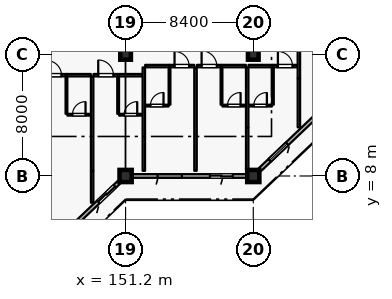
"""IFC4 building model, lengths in metres.
Left out: names, types, materials, properties, quantities, classifications, styles, units other than length and angle.
Written with IfcOpenShell. Run it as: python <this file> out.ifc"""

import sys

from ifc_helpers import new_model, si_unit, direction, frame, frame_2d, origin, origin_2d, place, context, subcontext, project, spatial, rectangle, extrude, element, fill, save


model = new_model("IFC4")
c1 = context("Model", 3, precision=1e-05, world=origin(), true_north=direction((0.0, 1.0)))
c2 = subcontext(c1, "Body", "Model", "MODEL_VIEW")
j1 = project(units=[si_unit("LENGTHUNIT", "METRE"), si_unit("PLANEANGLEUNIT", "RADIAN")], contexts=[c1])
p1 = place(None, origin())
s1 = spatial("IfcSite", under=j1, at=p1, CompositionType="ELEMENT")
p2 = place(p1, origin())
s2 = spatial("IfcBuilding", under=s1, at=p2, CompositionType="ELEMENT")
p3 = place(p2, frame((0.0, 0.0, 25.2)))
s3 = spatial("IfcBuildingStorey", under=s2, at=p3, CompositionType="ELEMENT", Elevation=25.2)
for number, where, z_axis, x_axis in (
    (1, (151.2, 8.0, 0.0), (0.0, 0.0, 1.0), (1.0, 0.0, 0.0)),
    (2, (159.6, 8.0, 0.0), (0.0, 0.0, 1.0), (1.0, 0.0, 0.0)),
):
    element("IfcColumn", number, at=place(p3, frame(where, z_axis=z_axis, x_axis=x_axis)), inside=s3, PredefinedType="COLUMN", context=c2, shape_type="SweptSolid", body=[
        extrude(rectangle(XDim=0.8, YDim=0.8, at=origin_2d()), origin(), (0.0, 0.0, 1.0), 3.6),
    ])
for number, where, z_axis, x_axis in (
    (3, (151.2, 16.0, 0.0), (0.0, 0.0, 1.0), (1.0, 0.0, 0.0)),
    (4, (159.6, 16.0, 0.0), (0.0, 0.0, 1.0), (1.0, 0.0, 0.0)),
):
    element("IfcColumn", number, at=place(p3, frame(where, z_axis=z_axis, x_axis=x_axis)), inside=s3, PredefinedType="COLUMN", context=c2, shape_type="SweptSolid", body=[
        extrude(rectangle(XDim=0.7, YDim=0.7, at=origin_2d()), origin(), (0.0, 0.0, 1.0), 3.6),
    ])
p4 = place(p3, frame((150.8, 7.619, 0.0), z_axis=(0.0, 0.0, 1.0), x_axis=(-0.724156739794, -0.689635422677, 0.0)))
e5 = element("IfcWall", 5, at=p4, inside=s3, PredefinedType="SOLIDWALL", context=c2, shape_type="SweptSolid", body=[
    extrude(rectangle(XDim=10.495, YDim=0.24, at=frame_2d((5.248, 0.0))), origin(), (0.0, 0.0, 1.0), 2.93),
])
p5 = place(p4, frame((0.424, 0.0, 0.0)))
e6 = element("IfcOpeningElement", 6, at=p5, cuts=e5, PredefinedType="OPENING", context=c2, shape_type="SweptSolid", body=[
    extrude(rectangle(XDim=1.5, YDim=2.25, at=frame_2d((0.75, 1.125))), frame((0.0, 0.13, 0.0), z_axis=(0.0, -1.0, 0.0), x_axis=(1.0, 0.0, 0.0)), (0.0, 0.0, 1.0), 0.26),
])
p6 = place(p4, frame((4.033, 0.0, 0.8)))
e7 = element("IfcOpeningElement", 7, at=p6, cuts=e5, PredefinedType="OPENING", context=c2, shape_type="SweptSolid", body=[
    extrude(rectangle(XDim=1.6, YDim=1.6, at=frame_2d((0.8, 0.8))), frame((0.0, 0.13, 0.0), z_axis=(0.0, -1.0, 0.0), x_axis=(1.0, 0.0, 0.0)), (0.0, 0.0, 1.0), 0.26),
])
p7 = place(p4, frame((8.107, 0.0, 0.8)))
e8 = element("IfcOpeningElement", 8, at=p7, cuts=e5, PredefinedType="OPENING", context=c2, shape_type="SweptSolid", body=[
    extrude(rectangle(XDim=1.6, YDim=1.6, at=frame_2d((0.8, 0.8))), frame((0.0, 0.13, 0.0), z_axis=(0.0, -1.0, 0.0), x_axis=(1.0, 0.0, 0.0)), (0.0, 0.0, 1.0), 0.26),
])
p8 = place(p3, frame((159.2, 8.0, 0.0), z_axis=(0.0, 0.0, 1.0), x_axis=(-1.0, 0.0, 0.0)))
e9 = element("IfcWall", 9, at=p8, inside=s3, PredefinedType="SOLIDWALL", context=c2, shape_type="SweptSolid", body=[
    extrude(rectangle(XDim=7.6, YDim=0.24, at=frame_2d((3.8, 0.0))), origin(), (0.0, 0.0, 1.0), 2.93),
])
p9 = place(p8, frame((0.95, 0.0, 0.0)))
e10 = element("IfcOpeningElement", 10, at=p9, cuts=e9, PredefinedType="OPENING", context=c2, shape_type="SweptSolid", body=[
    extrude(rectangle(XDim=1.5, YDim=2.25, at=frame_2d((0.75, 1.125))), frame((0.0, 0.13, 0.0), z_axis=(0.0, -1.0, 0.0), x_axis=(1.0, 0.0, 0.0)), (0.0, 0.0, 1.0), 0.26),
])
p10 = place(p8, frame((4.3, 0.0, 0.8)))
e11 = element("IfcOpeningElement", 11, at=p10, cuts=e9, PredefinedType="OPENING", context=c2, shape_type="SweptSolid", body=[
    extrude(rectangle(XDim=1.6, YDim=1.6, at=frame_2d((0.8, 0.8))), frame((0.0, 0.13, 0.0), z_axis=(0.0, -1.0, 0.0), x_axis=(1.0, 0.0, 0.0)), (0.0, 0.0, 1.0), 0.26),
])
p11 = place(p3, frame((167.6, 15.619, 0.0), z_axis=(0.0, 0.0, 1.0), x_axis=(-0.724156739794, -0.689635422677, 0.0)))
e12 = element("IfcWall", 12, at=p11, inside=s3, PredefinedType="SOLIDWALL", context=c2, shape_type="SweptSolid", body=[
    extrude(rectangle(XDim=10.495, YDim=0.24, at=frame_2d((5.248, 0.0))), origin(), (0.0, 0.0, 1.0), 2.93),
])
p12 = place(p11, frame((0.286, 0.0, 0.0)))
e13 = element("IfcOpeningElement", 13, at=p12, cuts=e12, PredefinedType="OPENING", context=c2, shape_type="SweptSolid", body=[
    extrude(rectangle(XDim=1.5, YDim=2.25, at=frame_2d((0.75, 1.125))), frame((0.0, 0.13, 0.0), z_axis=(0.0, -1.0, 0.0), x_axis=(1.0, 0.0, 0.0)), (0.0, 0.0, 1.0), 0.26),
])
p13 = place(p11, frame((3.757, 0.0, 0.8)))
e14 = element("IfcOpeningElement", 14, at=p13, cuts=e12, PredefinedType="OPENING", context=c2, shape_type="SweptSolid", body=[
    extrude(rectangle(XDim=1.6, YDim=1.6, at=frame_2d((0.8, 0.8))), frame((0.0, 0.13, 0.0), z_axis=(0.0, -1.0, 0.0), x_axis=(1.0, 0.0, 0.0)), (0.0, 0.0, 1.0), 0.26),
])
p14 = place(p11, frame((7.969, 0.0, 0.8)))
e15 = element("IfcOpeningElement", 15, at=p14, cuts=e12, PredefinedType="OPENING", context=c2, shape_type="SweptSolid", body=[
    extrude(rectangle(XDim=1.6, YDim=1.6, at=frame_2d((0.8, 0.8))), frame((0.0, 0.13, 0.0), z_axis=(0.0, -1.0, 0.0), x_axis=(1.0, 0.0, 0.0)), (0.0, 0.0, 1.0), 0.26),
])
p15 = place(p3, frame((145.69, 14.63, 0.0), z_axis=(0.0, 0.0, 1.0), x_axis=(1.0, 0.0, 0.0)))
e16 = element("IfcWall", 16, at=p15, inside=s3, PredefinedType="PARTITIONING", context=c2, shape_type="SweptSolid", body=[
    extrude(rectangle(XDim=1.62, YDim=0.16, at=frame_2d((0.81, 0.0))), origin(), (0.0, 0.0, 1.0), 3.335),
])
p16 = place(p15, frame((0.33, 0.0, 0.0)))
e17 = element("IfcOpeningElement", 17, at=p16, cuts=e16, PredefinedType="OPENING", context=c2, shape_type="SweptSolid", body=[
    extrude(rectangle(XDim=0.96, YDim=2.2, at=frame_2d((0.48, 1.1))), frame((0.0, 0.09, 0.0), z_axis=(0.0, -1.0, 0.0), x_axis=(1.0, 0.0, 0.0)), (0.0, 0.0, 1.0), 0.18),
])
p17 = place(p3, frame((147.32, 14.63, 0.0), z_axis=(0.0, 0.0, 1.0), x_axis=(1.0, 0.0, 0.0)))
e18 = element("IfcWall", 18, at=p17, inside=s3, PredefinedType="PARTITIONING", context=c2, shape_type="SweptSolid", body=[
    extrude(rectangle(XDim=1.59, YDim=0.16, at=frame_2d((0.795, 0.0))), origin(), (0.0, 0.0, 1.0), 3.335),
])
p18 = place(p3, frame((147.31, 12.09, 0.0), z_axis=(0.0, 0.0, 1.0), x_axis=(0.0, 1.0, 0.0)))
e19 = element("IfcWall", 19, at=p18, inside=s3, PredefinedType="PARTITIONING", context=c2, shape_type="SweptSolid", body=[
    extrude(rectangle(XDim=2.45, YDim=0.115, at=frame_2d((1.225, 0.0))), origin(), (0.0, 0.0, 1.0), 3.335),
])
p19 = place(p3, frame((147.37, 12.03, 0.0), z_axis=(0.0, 0.0, 1.0), x_axis=(1.0, 0.0, 0.0)))
e20 = element("IfcWall", 20, at=p19, inside=s3, PredefinedType="PARTITIONING", context=c2, shape_type="SweptSolid", body=[
    extrude(rectangle(XDim=1.53, YDim=0.115, at=frame_2d((0.765, 0.0))), origin(), (0.0, 0.0, 1.0), 3.335),
])
p20 = place(p19, frame((0.335, 0.0, 0.0)))
e21 = element("IfcOpeningElement", 21, at=p20, cuts=e20, PredefinedType="OPENING", context=c2, shape_type="SweptSolid", body=[
    extrude(rectangle(XDim=0.86, YDim=2.12, at=frame_2d((0.43, 1.06))), frame((0.0, 0.067, 0.0), z_axis=(0.0, -1.0, 0.0), x_axis=(1.0, 0.0, 0.0)), (0.0, 0.0, 1.0), 0.135),
])
p21 = place(p3, frame((149.0, 6.24, 0.0), z_axis=(0.0, 0.0, 1.0), x_axis=(0.0, 1.0, 0.0)))
e22 = element("IfcWall", 22, at=p21, inside=s3, PredefinedType="PARTITIONING", context=c2, shape_type="SweptSolid", body=[
    extrude(rectangle(XDim=2.09, YDim=0.16, at=frame_2d((1.045, 0.0))), origin(), (0.0, 0.0, 1.0), 3.335),
])
p22 = place(p3, frame((149.09, 14.63, 0.0), z_axis=(0.0, 0.0, 1.0), x_axis=(1.0, 0.0, 0.0)))
e23 = element("IfcWall", 23, at=p22, inside=s3, PredefinedType="PARTITIONING", context=c2, shape_type="SweptSolid", body=[
    extrude(rectangle(XDim=1.62, YDim=0.16, at=frame_2d((0.81, 0.0))), origin(), (0.0, 0.0, 1.0), 3.335),
])
p23 = place(p22, frame((0.31, 0.0, 0.0)))
e24 = element("IfcOpeningElement", 24, at=p23, cuts=e23, PredefinedType="OPENING", context=c2, shape_type="SweptSolid", body=[
    extrude(rectangle(XDim=1.0, YDim=2.25, at=frame_2d((0.5, 1.125))), frame((0.0, 0.09, 0.0), z_axis=(0.0, -1.0, 0.0), x_axis=(1.0, 0.0, 0.0)), (0.0, 0.0, 1.0), 0.18),
])
p24 = place(p3, frame((150.72, 14.63, 0.0), z_axis=(0.0, 0.0, 1.0), x_axis=(1.0, 0.0, 0.0)))
e25 = element("IfcWall", 25, at=p24, inside=s3, PredefinedType="PARTITIONING", context=c2, shape_type="SweptSolid", body=[
    extrude(rectangle(XDim=1.59, YDim=0.16, at=frame_2d((0.795, 0.0))), origin(), (0.0, 0.0, 1.0), 3.335),
])
p25 = place(p3, frame((150.71, 12.09, 0.0), z_axis=(0.0, 0.0, 1.0), x_axis=(0.0, 1.0, 0.0)))
e26 = element("IfcWall", 26, at=p25, inside=s3, PredefinedType="PARTITIONING", context=c2, shape_type="SweptSolid", body=[
    extrude(rectangle(XDim=2.45, YDim=0.115, at=frame_2d((1.225, 0.0))), origin(), (0.0, 0.0, 1.0), 3.335),
])
p26 = place(p3, frame((150.77, 12.03, 0.0), z_axis=(0.0, 0.0, 1.0), x_axis=(1.0, 0.0, 0.0)))
e27 = element("IfcWall", 27, at=p26, inside=s3, PredefinedType="PARTITIONING", context=c2, shape_type="SweptSolid", body=[
    extrude(rectangle(XDim=1.53, YDim=0.115, at=frame_2d((0.765, 0.0))), origin(), (0.0, 0.0, 1.0), 3.335),
])
p27 = place(p26, frame((0.335, 0.0, 0.0)))
e28 = element("IfcOpeningElement", 28, at=p27, cuts=e27, PredefinedType="OPENING", context=c2, shape_type="SweptSolid", body=[
    extrude(rectangle(XDim=0.86, YDim=2.12, at=frame_2d((0.43, 1.06))), frame((0.0, 0.067, 0.0), z_axis=(0.0, -1.0, 0.0), x_axis=(1.0, 0.0, 0.0)), (0.0, 0.0, 1.0), 0.135),
])
p28 = place(p3, frame((149.0, 8.34, 0.0), z_axis=(0.0, 0.0, 1.0), x_axis=(0.0, 1.0, 0.0)))
e29 = element("IfcWall", 29, at=p28, inside=s3, PredefinedType="PARTITIONING", context=c2, shape_type="SweptSolid", body=[
    extrude(rectangle(XDim=6.2, YDim=0.16, at=frame_2d((3.1, 0.0))), origin(), (0.0, 0.0, 1.0), 3.335),
])
p29 = place(p3, frame((152.49, 15.23, 0.0), z_axis=(0.0, 0.0, 1.0), x_axis=(1.0, 0.0, 0.0)))
e30 = element("IfcWall", 30, at=p29, inside=s3, PredefinedType="PARTITIONING", context=c2, shape_type="SweptSolid", body=[
    extrude(rectangle(XDim=1.59, YDim=0.16, at=frame_2d((0.795, 0.0))), origin(), (0.0, 0.0, 1.0), 3.335),
])
p30 = place(p3, frame((154.09, 15.23, 0.0), z_axis=(0.0, 0.0, 1.0), x_axis=(1.0, 0.0, 0.0)))
e31 = element("IfcWall", 31, at=p30, inside=s3, PredefinedType="PARTITIONING", context=c2, shape_type="SweptSolid", body=[
    extrude(rectangle(XDim=1.62, YDim=0.16, at=frame_2d((0.81, 0.0))), origin(), (0.0, 0.0, 1.0), 3.335),
])
p31 = place(p30, frame((0.33, 0.0, 0.0)))
e32 = element("IfcOpeningElement", 32, at=p31, cuts=e31, PredefinedType="OPENING", context=c2, shape_type="SweptSolid", body=[
    extrude(rectangle(XDim=0.96, YDim=2.2, at=frame_2d((0.48, 1.1))), frame((0.0, 0.09, 0.0), z_axis=(0.0, -1.0, 0.0), x_axis=(1.0, 0.0, 0.0)), (0.0, 0.0, 1.0), 0.18),
])
p32 = place(p3, frame((154.09, 12.69, 0.0), z_axis=(0.0, 0.0, 1.0), x_axis=(0.0, 1.0, 0.0)))
e33 = element("IfcWall", 33, at=p32, inside=s3, PredefinedType="PARTITIONING", context=c2, shape_type="SweptSolid", body=[
    extrude(rectangle(XDim=2.45, YDim=0.115, at=frame_2d((1.225, 0.0))), origin(), (0.0, 0.0, 1.0), 3.335),
])
p33 = place(p3, frame((152.5, 12.63, 0.0), z_axis=(0.0, 0.0, 1.0), x_axis=(1.0, 0.0, 0.0)))
e34 = element("IfcWall", 34, at=p33, inside=s3, PredefinedType="PARTITIONING", context=c2, shape_type="SweptSolid", body=[
    extrude(rectangle(XDim=1.53, YDim=0.115, at=frame_2d((0.765, 0.0))), origin(), (0.0, 0.0, 1.0), 3.335),
])
p34 = place(p33, frame((0.335, 0.0, 0.0)))
e35 = element("IfcOpeningElement", 35, at=p34, cuts=e34, PredefinedType="OPENING", context=c2, shape_type="SweptSolid", body=[
    extrude(rectangle(XDim=0.86, YDim=2.12, at=frame_2d((0.43, 1.06))), frame((0.0, 0.067, 0.0), z_axis=(0.0, -1.0, 0.0), x_axis=(1.0, 0.0, 0.0)), (0.0, 0.0, 1.0), 0.135),
])
p35 = place(p3, frame((152.4, 8.34, 0.0), z_axis=(0.0, 0.0, 1.0), x_axis=(0.0, 1.0, 0.0)))
e36 = element("IfcWall", 36, at=p35, inside=s3, PredefinedType="PARTITIONING", context=c2, shape_type="SweptSolid", body=[
    extrude(rectangle(XDim=6.8, YDim=0.16, at=frame_2d((3.4, 0.0))), origin(), (0.0, 0.0, 1.0), 3.335),
])
p36 = place(p3, frame((155.89, 15.23, 0.0), z_axis=(0.0, 0.0, 1.0), x_axis=(1.0, 0.0, 0.0)))
e37 = element("IfcWall", 37, at=p36, inside=s3, PredefinedType="PARTITIONING", context=c2, shape_type="SweptSolid", body=[
    extrude(rectangle(XDim=1.62, YDim=0.16, at=frame_2d((0.81, 0.0))), origin(), (0.0, 0.0, 1.0), 3.335),
])
p37 = place(p36, frame((0.31, 0.0, 0.0)))
e38 = element("IfcOpeningElement", 38, at=p37, cuts=e37, PredefinedType="OPENING", context=c2, shape_type="SweptSolid", body=[
    extrude(rectangle(XDim=1.0, YDim=2.25, at=frame_2d((0.5, 1.125))), frame((0.0, 0.09, 0.0), z_axis=(0.0, -1.0, 0.0), x_axis=(1.0, 0.0, 0.0)), (0.0, 0.0, 1.0), 0.18),
])
p38 = place(p3, frame((157.52, 15.23, 0.0), z_axis=(0.0, 0.0, 1.0), x_axis=(1.0, 0.0, 0.0)))
e39 = element("IfcWall", 39, at=p38, inside=s3, PredefinedType="PARTITIONING", context=c2, shape_type="SweptSolid", body=[
    extrude(rectangle(XDim=1.59, YDim=0.16, at=frame_2d((0.795, 0.0))), origin(), (0.0, 0.0, 1.0), 3.335),
])
p39 = place(p3, frame((157.51, 12.69, 0.0), z_axis=(0.0, 0.0, 1.0), x_axis=(0.0, 1.0, 0.0)))
e40 = element("IfcWall", 40, at=p39, inside=s3, PredefinedType="PARTITIONING", context=c2, shape_type="SweptSolid", body=[
    extrude(rectangle(XDim=2.45, YDim=0.115, at=frame_2d((1.225, 0.0))), origin(), (0.0, 0.0, 1.0), 3.335),
])
p40 = place(p3, frame((157.57, 12.63, 0.0), z_axis=(0.0, 0.0, 1.0), x_axis=(1.0, 0.0, 0.0)))
e41 = element("IfcWall", 41, at=p40, inside=s3, PredefinedType="PARTITIONING", context=c2, shape_type="SweptSolid", body=[
    extrude(rectangle(XDim=1.53, YDim=0.115, at=frame_2d((0.765, 0.0))), origin(), (0.0, 0.0, 1.0), 3.335),
])
p41 = place(p40, frame((0.335, 0.0, 0.0)))
e42 = element("IfcOpeningElement", 42, at=p41, cuts=e41, PredefinedType="OPENING", context=c2, shape_type="SweptSolid", body=[
    extrude(rectangle(XDim=0.86, YDim=2.12, at=frame_2d((0.43, 1.06))), frame((0.0, 0.067, 0.0), z_axis=(0.0, -1.0, 0.0), x_axis=(1.0, 0.0, 0.0)), (0.0, 0.0, 1.0), 0.135),
])
p42 = place(p3, frame((155.8, 8.34, 0.0), z_axis=(0.0, 0.0, 1.0), x_axis=(0.0, 1.0, 0.0)))
e43 = element("IfcWall", 43, at=p42, inside=s3, PredefinedType="PARTITIONING", context=c2, shape_type="SweptSolid", body=[
    extrude(rectangle(XDim=6.8, YDim=0.16, at=frame_2d((3.4, 0.0))), origin(), (0.0, 0.0, 1.0), 3.335),
])
p43 = place(p3, frame((159.2, 8.41, 0.0), z_axis=(0.0, 0.0, 1.0), x_axis=(0.0, 1.0, 0.0)))
e44 = element("IfcWall", 44, at=p43, inside=s3, PredefinedType="PARTITIONING", context=c2, shape_type="SweptSolid", body=[
    extrude(rectangle(XDim=2.78, YDim=0.16, at=frame_2d((1.39, 0.0))), origin(), (0.0, 0.0, 1.0), 3.335),
])
p44 = place(p3, frame((159.29, 15.23, 0.0), z_axis=(0.0, 0.0, 1.0), x_axis=(1.0, 0.0, 0.0)))
e45 = element("IfcWall", 45, at=p44, inside=s3, PredefinedType="PARTITIONING", context=c2, shape_type="SweptSolid", body=[
    extrude(rectangle(XDim=1.59, YDim=0.16, at=frame_2d((0.795, 0.0))), origin(), (0.0, 0.0, 1.0), 3.335),
])
p45 = place(p3, frame((160.89, 15.23, 0.0), z_axis=(0.0, 0.0, 1.0), x_axis=(1.0, 0.0, 0.0)))
e46 = element("IfcWall", 46, at=p45, inside=s3, PredefinedType="PARTITIONING", context=c2, shape_type="SweptSolid", body=[
    extrude(rectangle(XDim=1.62, YDim=0.16, at=frame_2d((0.81, 0.0))), origin(), (0.0, 0.0, 1.0), 3.335),
])
p46 = place(p45, frame((0.33, 0.0, 0.0)))
e47 = element("IfcOpeningElement", 47, at=p46, cuts=e46, PredefinedType="OPENING", context=c2, shape_type="SweptSolid", body=[
    extrude(rectangle(XDim=0.96, YDim=2.2, at=frame_2d((0.48, 1.1))), frame((0.0, 0.09, 0.0), z_axis=(0.0, -1.0, 0.0), x_axis=(1.0, 0.0, 0.0)), (0.0, 0.0, 1.0), 0.18),
])
p47 = place(p3, frame((160.89, 12.69, 0.0), z_axis=(0.0, 0.0, 1.0), x_axis=(0.0, 1.0, 0.0)))
e48 = element("IfcWall", 48, at=p47, inside=s3, PredefinedType="PARTITIONING", context=c2, shape_type="SweptSolid", body=[
    extrude(rectangle(XDim=2.45, YDim=0.115, at=frame_2d((1.225, 0.0))), origin(), (0.0, 0.0, 1.0), 3.335),
])
p48 = place(p3, frame((159.3, 12.63, 0.0), z_axis=(0.0, 0.0, 1.0), x_axis=(1.0, 0.0, 0.0)))
e49 = element("IfcWall", 49, at=p48, inside=s3, PredefinedType="PARTITIONING", context=c2, shape_type="SweptSolid", body=[
    extrude(rectangle(XDim=1.53, YDim=0.115, at=frame_2d((0.765, 0.0))), origin(), (0.0, 0.0, 1.0), 3.335),
])
p49 = place(p48, frame((0.335, 0.0, 0.0)))
e50 = element("IfcOpeningElement", 50, at=p49, cuts=e49, PredefinedType="OPENING", context=c2, shape_type="SweptSolid", body=[
    extrude(rectangle(XDim=0.86, YDim=2.12, at=frame_2d((0.43, 1.06))), frame((0.0, 0.067, 0.0), z_axis=(0.0, -1.0, 0.0), x_axis=(1.0, 0.0, 0.0)), (0.0, 0.0, 1.0), 0.135),
])
p50 = place(p3, frame((159.2, 11.2, 0.0), z_axis=(0.0, 0.0, 1.0), x_axis=(0.0, 1.0, 0.0)))
e51 = element("IfcWall", 51, at=p50, inside=s3, PredefinedType="PARTITIONING", context=c2, shape_type="SweptSolid", body=[
    extrude(rectangle(XDim=3.94, YDim=0.16, at=frame_2d((1.97, 0.0))), origin(), (0.0, 0.0, 1.0), 3.335),
])
p51 = place(p3, frame((162.6, 11.2, 0.0), z_axis=(0.0, 0.0, 1.0), x_axis=(0.0, 1.0, 0.0)))
e52 = element("IfcWall", 52, at=p51, inside=s3, PredefinedType="PARTITIONING", context=c2, shape_type="SweptSolid", body=[
    extrude(rectangle(XDim=3.23, YDim=0.16, at=frame_2d((1.615, 0.0))), origin(), (0.0, 0.0, 1.0), 3.335),
])
p52 = place(p3, frame((162.6, 14.44, 0.0), z_axis=(0.0, 0.0, 1.0), x_axis=(0.0, 1.0, 0.0)))
e53 = element("IfcWall", 53, at=p52, inside=s3, PredefinedType="PARTITIONING", context=c2, shape_type="SweptSolid", body=[
    extrude(rectangle(XDim=8.7, YDim=0.16, at=frame_2d((4.35, 0.0))), origin(), (0.0, 0.0, 1.0), 3.335),
])
p53 = place(p5, origin())
e54 = element("IfcDoor", 54, at=p53, inside=s3, OperationType="SLIDING_TO_LEFT", PredefinedType="DOOR", context=c2, shape_type="SweptSolid", body=[
    extrude(rectangle(XDim=1.5, YDim=2.25, at=frame_2d((0.75, 1.125))), frame((0.0, 0.025, 0.0), z_axis=(0.0, -1.0, 0.0), x_axis=(1.0, 0.0, 0.0)), (0.0, 0.0, 1.0), 0.05),
])
fill(e6, e54)
p54 = place(p9, origin())
e55 = element("IfcDoor", 55, at=p54, inside=s3, OperationType="SLIDING_TO_LEFT", PredefinedType="DOOR", context=c2, shape_type="SweptSolid", body=[
    extrude(rectangle(XDim=1.5, YDim=2.25, at=frame_2d((0.75, 1.125))), frame((0.0, 0.025, 0.0), z_axis=(0.0, -1.0, 0.0), x_axis=(1.0, 0.0, 0.0)), (0.0, 0.0, 1.0), 0.05),
])
fill(e10, e55)
p55 = place(p10, origin())
e56 = element("IfcWindow", 56, at=p55, inside=s3, PartitioningType="SINGLE_PANEL", PredefinedType="WINDOW", context=c2, shape_type="SweptSolid", body=[
    extrude(rectangle(XDim=1.6, YDim=1.6, at=frame_2d((0.8, 0.8))), frame((0.0, 0.03, 0.0), z_axis=(0.0, -1.0, 0.0), x_axis=(1.0, 0.0, 0.0)), (0.0, 0.0, 1.0), 0.06),
])
fill(e11, e56)
p56 = place(p14, origin())
e57 = element("IfcWindow", 57, at=p56, inside=s3, PartitioningType="SINGLE_PANEL", PredefinedType="WINDOW", context=c2, shape_type="SweptSolid", body=[
    extrude(rectangle(XDim=1.6, YDim=1.6, at=frame_2d((0.8, 0.8))), frame((0.0, 0.03, 0.0), z_axis=(0.0, -1.0, 0.0), x_axis=(1.0, 0.0, 0.0)), (0.0, 0.0, 1.0), 0.06),
])
fill(e15, e57)
p57 = place(p16, origin())
e58 = element("IfcDoor", 58, at=p57, inside=s3, OperationType="SINGLE_SWING_LEFT", PredefinedType="DOOR", context=c2, shape_type="SweptSolid", body=[
    extrude(rectangle(XDim=0.96, YDim=2.2, at=frame_2d((0.48, 1.1))), frame((0.0, 0.025, 0.0), z_axis=(0.0, -1.0, 0.0), x_axis=(1.0, 0.0, 0.0)), (0.0, 0.0, 1.0), 0.05),
])
fill(e17, e58)
p58 = place(p20, origin())
e59 = element("IfcDoor", 59, at=p58, inside=s3, OperationType="SINGLE_SWING_RIGHT", PredefinedType="DOOR", context=c2, shape_type="SweptSolid", body=[
    extrude(rectangle(XDim=0.86, YDim=2.12, at=frame_2d((0.43, 1.06))), frame((0.0, 0.025, 0.0), z_axis=(0.0, -1.0, 0.0), x_axis=(1.0, 0.0, 0.0)), (0.0, 0.0, 1.0), 0.05),
])
fill(e21, e59)
p59 = place(p23, origin())
e60 = element("IfcDoor", 60, at=p59, inside=s3, OperationType="SINGLE_SWING_LEFT", PredefinedType="DOOR", context=c2, shape_type="SweptSolid", body=[
    extrude(rectangle(XDim=1.0, YDim=2.25, at=frame_2d((0.5, 1.125))), frame((0.0, 0.025, 0.0), z_axis=(0.0, -1.0, 0.0), x_axis=(1.0, 0.0, 0.0)), (0.0, 0.0, 1.0), 0.05),
])
fill(e24, e60)
p60 = place(p27, origin())
e61 = element("IfcDoor", 61, at=p60, inside=s3, OperationType="SINGLE_SWING_RIGHT", PredefinedType="DOOR", context=c2, shape_type="SweptSolid", body=[
    extrude(rectangle(XDim=0.86, YDim=2.12, at=frame_2d((0.43, 1.06))), frame((0.0, 0.025, 0.0), z_axis=(0.0, -1.0, 0.0), x_axis=(1.0, 0.0, 0.0)), (0.0, 0.0, 1.0), 0.05),
])
fill(e28, e61)
p61 = place(p31, origin())
e62 = element("IfcDoor", 62, at=p61, inside=s3, OperationType="SINGLE_SWING_LEFT", PredefinedType="DOOR", context=c2, shape_type="SweptSolid", body=[
    extrude(rectangle(XDim=0.96, YDim=2.2, at=frame_2d((0.48, 1.1))), frame((0.0, 0.025, 0.0), z_axis=(0.0, -1.0, 0.0), x_axis=(1.0, 0.0, 0.0)), (0.0, 0.0, 1.0), 0.05),
])
fill(e32, e62)
p62 = place(p34, origin())
e63 = element("IfcDoor", 63, at=p62, inside=s3, OperationType="SINGLE_SWING_RIGHT", PredefinedType="DOOR", context=c2, shape_type="SweptSolid", body=[
    extrude(rectangle(XDim=0.86, YDim=2.12, at=frame_2d((0.43, 1.06))), frame((0.0, 0.025, 0.0), z_axis=(0.0, -1.0, 0.0), x_axis=(1.0, 0.0, 0.0)), (0.0, 0.0, 1.0), 0.05),
])
fill(e35, e63)
p63 = place(p37, origin())
e64 = element("IfcDoor", 64, at=p63, inside=s3, OperationType="SINGLE_SWING_LEFT", PredefinedType="DOOR", context=c2, shape_type="SweptSolid", body=[
    extrude(rectangle(XDim=1.0, YDim=2.25, at=frame_2d((0.5, 1.125))), frame((0.0, 0.025, 0.0), z_axis=(0.0, -1.0, 0.0), x_axis=(1.0, 0.0, 0.0)), (0.0, 0.0, 1.0), 0.05),
])
fill(e38, e64)
p64 = place(p41, origin())
e65 = element("IfcDoor", 65, at=p64, inside=s3, OperationType="SINGLE_SWING_RIGHT", PredefinedType="DOOR", context=c2, shape_type="SweptSolid", body=[
    extrude(rectangle(XDim=0.86, YDim=2.12, at=frame_2d((0.43, 1.06))), frame((0.0, 0.025, 0.0), z_axis=(0.0, -1.0, 0.0), x_axis=(1.0, 0.0, 0.0)), (0.0, 0.0, 1.0), 0.05),
])
fill(e42, e65)
p65 = place(p46, origin())
e66 = element("IfcDoor", 66, at=p65, inside=s3, OperationType="SINGLE_SWING_LEFT", PredefinedType="DOOR", context=c2, shape_type="SweptSolid", body=[
    extrude(rectangle(XDim=0.96, YDim=2.2, at=frame_2d((0.48, 1.1))), frame((0.0, 0.025, 0.0), z_axis=(0.0, -1.0, 0.0), x_axis=(1.0, 0.0, 0.0)), (0.0, 0.0, 1.0), 0.05),
])
fill(e47, e66)
p66 = place(p49, origin())
e67 = element("IfcDoor", 67, at=p66, inside=s3, OperationType="SINGLE_SWING_RIGHT", PredefinedType="DOOR", context=c2, shape_type="SweptSolid", body=[
    extrude(rectangle(XDim=0.86, YDim=2.12, at=frame_2d((0.43, 1.06))), frame((0.0, 0.025, 0.0), z_axis=(0.0, -1.0, 0.0), x_axis=(1.0, 0.0, 0.0)), (0.0, 0.0, 1.0), 0.05),
])
fill(e50, e67)
save(model, sys.argv[1])
